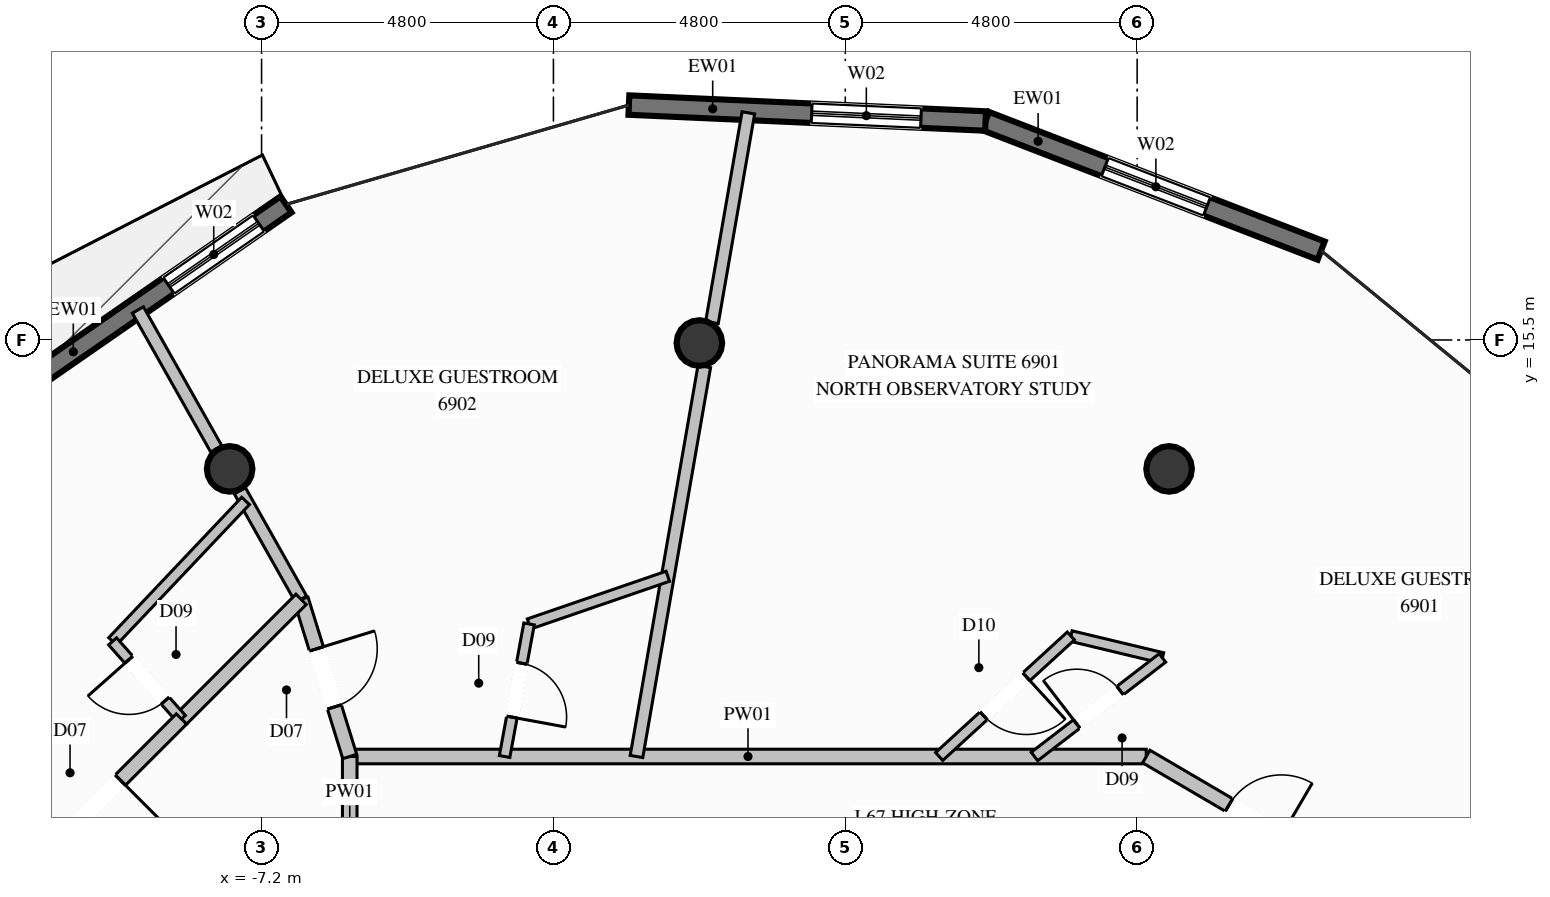
"""IFC4 building model, lengths in metres.
Left out: names, types, materials, properties, quantities, classifications, styles, units other than length and angle.
Written with IfcOpenShell. Run it as: python <this file> out.ifc"""

import sys

from ifc_helpers import new_model, si_unit, direction, frame, frame_2d, origin, origin_2d, place, context, subcontext, project, spatial, rectangle, circle, extrude, element, fill, save


model = new_model("IFC4")
c1 = context("Model", 3, precision=1e-05, world=origin(), true_north=direction((0.0, 1.0)))
c2 = subcontext(c1, "Body", "Model", "MODEL_VIEW")
j1 = project(units=[si_unit("LENGTHUNIT", "METRE"), si_unit("PLANEANGLEUNIT", "RADIAN")], contexts=[c1])
p1 = place(None, origin())
s1 = spatial("IfcSite", under=j1, at=p1, CompositionType="ELEMENT")
p2 = place(p1, origin())
s2 = spatial("IfcBuilding", under=s1, at=p2, CompositionType="ELEMENT")
p3 = place(p2, frame((0.0, 0.0, 258.2)))
s3 = spatial("IfcBuildingStorey", under=s2, at=p3, CompositionType="ELEMENT", Elevation=258.2)
for number, where, z_axis, x_axis in (
    (1, (7.725, 13.38, 0.0), (0.0, 0.0, 1.0), (1.0, 0.0, 0.0)),
    (2, (0.0, 15.45, 0.0), (0.0, 0.0, 1.0), (1.0, 0.0, 0.0)),
    (3, (-7.725, 13.38, 0.0), (0.0, 0.0, 1.0), (1.0, 0.0, 0.0)),
):
    element("IfcColumn", number, at=place(p3, frame(where, z_axis=z_axis, x_axis=x_axis)), inside=s3, PredefinedType="COLUMN", context=c2, shape_type="SweptSolid", body=[
        extrude(circle(Radius=0.375, at=origin_2d()), origin(), (0.0, 0.0, 1.0), 3.8),
    ])
p4 = place(p3, frame((4.707, 19.101, 0.0), z_axis=(0.0, 0.0, 1.0), x_axis=(0.932869372668, -0.360214843582, 0.0)))
e4 = element("IfcWall", 4, at=p4, inside=s3, PredefinedType="SOLIDWALL", context=c2, shape_type="SweptSolid", body=[
    extrude(rectangle(XDim=5.916, YDim=0.32, at=frame_2d((2.958, 0.0))), origin(), (0.0, 0.0, 1.0), 3.57),
])
p5 = place(p4, frame((2.103, 0.0, 0.35)))
e5 = element("IfcOpeningElement", 5, at=p5, cuts=e4, PredefinedType="OPENING", context=c2, shape_type="SweptSolid", body=[
    extrude(rectangle(XDim=1.8, YDim=2.6, at=frame_2d((0.9, 1.3))), frame((0.0, 0.17, 0.0), z_axis=(0.0, -1.0, 0.0), x_axis=(1.0, 0.0, 0.0)), (0.0, 0.0, 1.0), 0.34),
])
p6 = place(p3, frame((-1.159, 19.363, 0.0), z_axis=(0.0, 0.0, 1.0), x_axis=(0.999004316421, -0.044613627649, 0.0)))
e6 = element("IfcWall", 6, at=p6, inside=s3, PredefinedType="SOLIDWALL", context=c2, shape_type="SweptSolid", body=[
    extrude(rectangle(XDim=5.872, YDim=0.32, at=frame_2d((2.936, 0.0))), origin(), (0.0, 0.0, 1.0), 3.57),
])
p7 = place(p6, frame((3.009, 0.0, 0.35)))
e7 = element("IfcOpeningElement", 7, at=p7, cuts=e6, PredefinedType="OPENING", context=c2, shape_type="SweptSolid", body=[
    extrude(rectangle(XDim=1.8, YDim=2.6, at=frame_2d((0.9, 1.3))), frame((0.0, 0.17, 0.0), z_axis=(0.0, -1.0, 0.0), x_axis=(1.0, 0.0, 0.0)), (0.0, 0.0, 1.0), 0.34),
])
p8 = place(p3, frame((-11.661, 14.36, 0.0), z_axis=(0.0, 0.0, 1.0), x_axis=(0.821952888389, 0.569555483925, 0.0)))
e8 = element("IfcWall", 8, at=p8, inside=s3, PredefinedType="SOLIDWALL", context=c2, shape_type="SweptSolid", body=[
    extrude(rectangle(XDim=5.915, YDim=0.32, at=frame_2d((2.958, 0.0))), origin(), (0.0, 0.0, 1.0), 3.57),
])
p9 = place(p8, frame((3.57, 0.0, 0.35)))
e9 = element("IfcOpeningElement", 9, at=p9, cuts=e8, PredefinedType="OPENING", context=c2, shape_type="SweptSolid", body=[
    extrude(rectangle(XDim=1.8, YDim=2.6, at=frame_2d((0.9, 1.3))), frame((0.0, 0.17, 0.0), z_axis=(0.0, -1.0, 0.0), x_axis=(1.0, 0.0, 0.0)), (0.0, 0.0, 1.0), 0.34),
])
p10 = place(p3, frame((-5.75, 8.65, 0.0), z_axis=(0.0, 0.0, 1.0), x_axis=(1.0, 0.0, 0.0)))
e10 = element("IfcWall", 10, at=p10, inside=s3, PredefinedType="PARTITIONING", context=c2, shape_type="SweptSolid", body=[
    extrude(rectangle(XDim=13.1, YDim=0.24, at=frame_2d((6.55, 0.0))), origin(), (0.0, 0.0, 1.0), 3.57),
])
p11 = place(p3, frame((-5.75, 6.1, 0.0), z_axis=(0.0, 0.0, 1.0), x_axis=(0.0, 1.0, 0.0)))
e11 = element("IfcWall", 11, at=p11, inside=s3, PredefinedType="PARTITIONING", context=c2, shape_type="SweptSolid", body=[
    extrude(rectangle(XDim=2.55, YDim=0.24, at=frame_2d((1.275, 0.0))), origin(), (0.0, 0.0, 1.0), 3.57),
])
p12 = place(p3, frame((10.935, 6.55, 0.0), z_axis=(0.0, 0.0, 1.0), x_axis=(0.8804878863, 0.474068647011, 0.0)))
e12 = element("IfcWall", 12, at=p12, inside=s3, PredefinedType="PARTITIONING", context=c2, shape_type="SweptSolid", body=[
    extrude(rectangle(XDim=2.335, YDim=0.21, at=frame_2d((1.167, 0.0))), origin(), (0.0, 0.0, 1.0), 3.085),
])
p13 = place(p3, frame((-6.55, 11.235, 0.0), z_axis=(0.0, 0.0, 1.0), x_axis=(-0.491351277928, 0.87096149265, 0.0)))
e13 = element("IfcWall", 13, at=p13, inside=s3, PredefinedType="PARTITIONING", context=c2, shape_type="SweptSolid", body=[
    extrude(rectangle(XDim=2.052, YDim=0.21, at=frame_2d((1.026, 0.0))), origin(), (0.0, 0.0, 1.0), 3.085),
])
p14 = place(p3, frame((-7.945, 13.708, 0.0), z_axis=(0.0, 0.0, 1.0), x_axis=(-0.491290412496, 0.870995826965, 0.0)))
e14 = element("IfcWall", 14, at=p14, inside=s3, PredefinedType="PARTITIONING", context=c2, shape_type="SweptSolid", body=[
    extrude(rectangle(XDim=2.623, YDim=0.21, at=frame_2d((1.312, 0.0))), origin(), (0.0, 0.0, 1.0), 3.57),
])
p15 = place(p3, frame((6.11, 10.632, 0.0), z_axis=(0.0, 0.0, 1.0), x_axis=(0.972434507915, -0.233176173347, 0.0)))
e15 = element("IfcWall", 15, at=p15, inside=s3, PredefinedType="PLUMBINGWALL", context=c2, shape_type="SweptSolid", body=[
    extrude(rectangle(XDim=1.549, YDim=0.175, at=frame_2d((0.774, 0.0))), origin(), (0.0, 0.0, 1.0), 3.57),
])
p16 = place(p3, frame((6.11, 10.632, 0.0), z_axis=(0.0, 0.0, 1.0), x_axis=(-0.737719939181, -0.675106874009, 0.0)))
e16 = element("IfcWall", 16, at=p16, inside=s3, PredefinedType="PLUMBINGWALL", context=c2, shape_type="SweptSolid", body=[
    extrude(rectangle(XDim=2.936, YDim=0.175, at=frame_2d((1.468, 0.0))), origin(), (0.0, 0.0, 1.0), 3.57),
])
p17 = place(p16, frame((0.993, 0.0, 0.0)))
e17 = element("IfcOpeningElement", 17, at=p17, cuts=e16, PredefinedType="OPENING", context=c2, shape_type="SweptSolid", body=[
    extrude(rectangle(XDim=0.95, YDim=2.1, at=frame_2d((0.475, 1.05))), frame((0.0, 0.098, 0.0), z_axis=(0.0, -1.0, 0.0), x_axis=(1.0, 0.0, 0.0)), (0.0, 0.0, 1.0), 0.195),
])
p18 = place(p3, frame((5.511, 8.65, 0.0), z_axis=(0.0, 0.0, 1.0), x_axis=(0.792282263308, 0.610154746969, 0.0)))
e18 = element("IfcWall", 18, at=p18, inside=s3, PredefinedType="PLUMBINGWALL", context=c2, shape_type="SweptSolid", body=[
    extrude(rectangle(XDim=2.657, YDim=0.175, at=frame_2d((1.328, 0.0))), origin(), (0.0, 0.0, 1.0), 3.57),
])
p19 = place(p18, frame((0.878, 0.0, 0.0)))
e19 = element("IfcOpeningElement", 19, at=p19, cuts=e18, PredefinedType="OPENING", context=c2, shape_type="SweptSolid", body=[
    extrude(rectangle(XDim=0.9, YDim=2.1, at=frame_2d((0.45, 1.05))), frame((0.0, 0.098, 0.0), z_axis=(0.0, -1.0, 0.0), x_axis=(1.0, 0.0, 0.0)), (0.0, 0.0, 1.0), 0.195),
])
p20 = place(p3, frame((7.35, 8.65, 0.0), z_axis=(0.0, 0.0, 1.0), x_axis=(0.862873842462, -0.505419362505, 0.0)))
e20 = element("IfcWall", 20, at=p20, inside=s3, PredefinedType="PARTITIONING", context=c2, shape_type="SweptSolid", body=[
    extrude(rectangle(XDim=4.155, YDim=0.24, at=frame_2d((2.077, 0.0))), origin(), (0.0, 0.0, 1.0), 3.57),
])
p21 = place(p20, frame((1.577, 0.0, 0.0)))
e21 = element("IfcOpeningElement", 21, at=p21, cuts=e20, PredefinedType="OPENING", context=c2, shape_type="SweptSolid", body=[
    extrude(rectangle(XDim=1.0, YDim=2.2, at=frame_2d((0.5, 1.1))), frame((0.0, 0.13, 0.0), z_axis=(0.0, -1.0, 0.0), x_axis=(1.0, 0.0, 0.0)), (0.0, 0.0, 1.0), 0.26),
])
p22 = place(p3, frame((-1.034, 8.65, 0.0), z_axis=(0.0, 0.0, 1.0), x_axis=(0.171292106425, 0.985220287183, 0.0)))
e22 = element("IfcWall", 22, at=p22, inside=s3, PredefinedType="PARTITIONING", context=c2, shape_type="SweptSolid", body=[
    extrude(rectangle(XDim=6.509, YDim=0.21, at=frame_2d((3.255, 0.0))), origin(), (0.0, 0.0, 1.0), 3.57),
])
p23 = place(p3, frame((0.207, 15.787, 0.0), z_axis=(0.0, 0.0, 1.0), x_axis=(0.17112625243, 0.985249108464, 0.0)))
e23 = element("IfcWall", 23, at=p23, inside=s3, PredefinedType="PARTITIONING", context=c2, shape_type="SweptSolid", body=[
    extrude(rectangle(XDim=3.5, YDim=0.21, at=frame_2d((1.75, 0.0))), origin(), (0.0, 0.0, 1.0), 3.57),
])
p24 = place(p3, frame((-2.801, 10.83, 0.0), z_axis=(0.0, 0.0, 1.0), x_axis=(0.945749765069, 0.324895955455, 0.0)))
e24 = element("IfcWall", 24, at=p24, inside=s3, PredefinedType="PLUMBINGWALL", context=c2, shape_type="SweptSolid", body=[
    extrude(rectangle(XDim=2.413, YDim=0.175, at=frame_2d((1.207, 0.0))), origin(), (0.0, 0.0, 1.0), 3.57),
])
p25 = place(p3, frame((-2.801, 10.83, 0.0), z_axis=(0.0, 0.0, 1.0), x_axis=(-0.181268941006, -0.983433562081, 0.0)))
e25 = element("IfcWall", 25, at=p25, inside=s3, PredefinedType="PLUMBINGWALL", context=c2, shape_type="SweptSolid", body=[
    extrude(rectangle(XDim=2.217, YDim=0.175, at=frame_2d((1.108, 0.0))), origin(), (0.0, 0.0, 1.0), 3.57),
])
p26 = place(p25, frame((0.658, 0.0, 0.0)))
e26 = element("IfcOpeningElement", 26, at=p26, cuts=e25, PredefinedType="OPENING", context=c2, shape_type="SweptSolid", body=[
    extrude(rectangle(XDim=0.9, YDim=2.1, at=frame_2d((0.45, 1.05))), frame((0.0, 0.098, 0.0), z_axis=(0.0, -1.0, 0.0), x_axis=(1.0, 0.0, 0.0)), (0.0, 0.0, 1.0), 0.195),
])
p27 = place(p3, frame((-6.55, 11.235, 0.0), z_axis=(0.0, 0.0, 1.0), x_axis=(0.295638642954, -0.955299844443, 0.0)))
e27 = element("IfcWall", 27, at=p27, inside=s3, PredefinedType="PARTITIONING", context=c2, shape_type="SweptSolid", body=[
    extrude(rectangle(XDim=2.706, YDim=0.24, at=frame_2d((1.353, 0.0))), origin(), (0.0, 0.0, 1.0), 3.57),
])
p28 = place(p27, frame((0.853, 0.0, 0.0)))
e28 = element("IfcOpeningElement", 28, at=p28, cuts=e27, PredefinedType="OPENING", context=c2, shape_type="SweptSolid", body=[
    extrude(rectangle(XDim=1.0, YDim=2.2, at=frame_2d((0.5, 1.1))), frame((0.0, 0.13, 0.0), z_axis=(0.0, -1.0, 0.0), x_axis=(1.0, 0.0, 0.0)), (0.0, 0.0, 1.0), 0.26),
])
p29 = place(p3, frame((-6.55, 11.235, 0.0), z_axis=(0.0, 0.0, 1.0), x_axis=(-0.707106781187, -0.707106781187, 0.0)))
e29 = element("IfcWall", 29, at=p29, inside=s3, PredefinedType="PARTITIONING", context=c2, shape_type="SweptSolid", body=[
    extrude(rectangle(XDim=2.783, YDim=0.24, at=frame_2d((1.392, 0.0))), origin(), (0.0, 0.0, 1.0), 3.57),
])
p30 = place(p3, frame((-7.463, 12.853, 0.0), z_axis=(0.0, 0.0, 1.0), x_axis=(-0.687655215005, -0.726037399365, 0.0)))
e30 = element("IfcWall", 30, at=p30, inside=s3, PredefinedType="PLUMBINGWALL", context=c2, shape_type="SweptSolid", body=[
    extrude(rectangle(XDim=3.18, YDim=0.175, at=frame_2d((1.59, 0.0))), origin(), (0.0, 0.0, 1.0), 3.137),
])
p31 = place(p3, frame((-8.518, 9.267, 0.0), z_axis=(0.0, 0.0, 1.0), x_axis=(-0.663333009782, 0.748324340198, 0.0)))
e31 = element("IfcWall", 31, at=p31, inside=s3, PredefinedType="PLUMBINGWALL", context=c2, shape_type="SweptSolid", body=[
    extrude(rectangle(XDim=1.706, YDim=0.175, at=frame_2d((0.853, 0.0))), origin(), (0.0, 0.0, 1.0), 3.57),
])
p32 = place(p31, frame((0.403, 0.0, 0.0)))
e32 = element("IfcOpeningElement", 32, at=p32, cuts=e31, PredefinedType="OPENING", context=c2, shape_type="SweptSolid", body=[
    extrude(rectangle(XDim=0.9, YDim=2.1, at=frame_2d((0.45, 1.05))), frame((0.0, 0.098, 0.0), z_axis=(0.0, -1.0, 0.0), x_axis=(1.0, 0.0, 0.0)), (0.0, 0.0, 1.0), 0.195),
])
p33 = place(p3, frame((-8.518, 9.267, 0.0), z_axis=(0.0, 0.0, 1.0), x_axis=(-0.707106781187, -0.707106781187, 0.0)))
e33 = element("IfcWall", 33, at=p33, inside=s3, PredefinedType="PARTITIONING", context=c2, shape_type="SweptSolid", body=[
    extrude(rectangle(XDim=3.843, YDim=0.24, at=frame_2d((1.921, 0.0))), origin(), (0.0, 0.0, 1.0), 3.57),
])
p34 = place(p33, frame((1.421, 0.0, 0.0)))
e34 = element("IfcOpeningElement", 34, at=p34, cuts=e33, PredefinedType="OPENING", context=c2, shape_type="SweptSolid", body=[
    extrude(rectangle(XDim=1.0, YDim=2.2, at=frame_2d((0.5, 1.1))), frame((0.0, 0.13, 0.0), z_axis=(0.0, -1.0, 0.0), x_axis=(1.0, 0.0, 0.0)), (0.0, 0.0, 1.0), 0.26),
])
p35 = place(p5, origin())
e35 = element("IfcWindow", 35, at=p35, inside=s3, PartitioningType="SINGLE_PANEL", PredefinedType="WINDOW", context=c2, shape_type="SweptSolid", body=[
    extrude(rectangle(XDim=1.8, YDim=2.6, at=frame_2d((0.9, 1.3))), frame((0.0, 0.03, 0.0), z_axis=(0.0, -1.0, 0.0), x_axis=(1.0, 0.0, 0.0)), (0.0, 0.0, 1.0), 0.06),
])
fill(e5, e35)
p36 = place(p7, origin())
e36 = element("IfcWindow", 36, at=p36, inside=s3, PartitioningType="SINGLE_PANEL", PredefinedType="WINDOW", context=c2, shape_type="SweptSolid", body=[
    extrude(rectangle(XDim=1.8, YDim=2.6, at=frame_2d((0.9, 1.3))), frame((0.0, 0.03, 0.0), z_axis=(0.0, -1.0, 0.0), x_axis=(1.0, 0.0, 0.0)), (0.0, 0.0, 1.0), 0.06),
])
fill(e7, e36)
p37 = place(p9, origin())
e37 = element("IfcWindow", 37, at=p37, inside=s3, PartitioningType="SINGLE_PANEL", PredefinedType="WINDOW", context=c2, shape_type="SweptSolid", body=[
    extrude(rectangle(XDim=1.8, YDim=2.6, at=frame_2d((0.9, 1.3))), frame((0.0, 0.03, 0.0), z_axis=(0.0, -1.0, 0.0), x_axis=(1.0, 0.0, 0.0)), (0.0, 0.0, 1.0), 0.06),
])
fill(e9, e37)
p38 = place(p19, origin())
e38 = element("IfcDoor", 38, at=p38, inside=s3, OperationType="SINGLE_SWING_LEFT", PredefinedType="DOOR", context=c2, shape_type="SweptSolid", body=[
    extrude(rectangle(XDim=0.9, YDim=2.1, at=frame_2d((0.45, 1.05))), frame((0.0, 0.025, 0.0), z_axis=(0.0, -1.0, 0.0), x_axis=(1.0, 0.0, 0.0)), (0.0, 0.0, 1.0), 0.05),
])
fill(e19, e38)
p39 = place(p21, origin())
e39 = element("IfcDoor", 39, at=p39, inside=s3, OperationType="SINGLE_SWING_RIGHT", PredefinedType="DOOR", context=c2, shape_type="SweptSolid", body=[
    extrude(rectangle(XDim=1.0, YDim=2.2, at=frame_2d((0.5, 1.1))), frame((0.0, 0.025, 0.0), z_axis=(0.0, -1.0, 0.0), x_axis=(1.0, 0.0, 0.0)), (0.0, 0.0, 1.0), 0.05),
])
fill(e21, e39)
p40 = place(p17, origin())
e40 = element("IfcDoor", 40, at=p40, inside=s3, OperationType="SINGLE_SWING_LEFT", PredefinedType="DOOR", context=c2, shape_type="SweptSolid", body=[
    extrude(rectangle(XDim=0.95, YDim=2.1, at=frame_2d((0.475, 1.05))), frame((0.0, 0.025, 0.0), z_axis=(0.0, -1.0, 0.0), x_axis=(1.0, 0.0, 0.0)), (0.0, 0.0, 1.0), 0.05),
])
fill(e17, e40)
p41 = place(p26, origin())
e41 = element("IfcDoor", 41, at=p41, inside=s3, OperationType="SINGLE_SWING_RIGHT", PredefinedType="DOOR", context=c2, shape_type="SweptSolid", body=[
    extrude(rectangle(XDim=0.9, YDim=2.1, at=frame_2d((0.45, 1.05))), frame((0.0, 0.025, 0.0), z_axis=(0.0, -1.0, 0.0), x_axis=(1.0, 0.0, 0.0)), (0.0, 0.0, 1.0), 0.05),
])
fill(e26, e41)
p42 = place(p28, origin())
e42 = element("IfcDoor", 42, at=p42, inside=s3, OperationType="SINGLE_SWING_LEFT", PredefinedType="DOOR", context=c2, shape_type="SweptSolid", body=[
    extrude(rectangle(XDim=1.0, YDim=2.2, at=frame_2d((0.5, 1.1))), frame((0.0, 0.025, 0.0), z_axis=(0.0, -1.0, 0.0), x_axis=(1.0, 0.0, 0.0)), (0.0, 0.0, 1.0), 0.05),
])
fill(e28, e42)
p43 = place(p32, origin())
e43 = element("IfcDoor", 43, at=p43, inside=s3, OperationType="SINGLE_SWING_RIGHT", PredefinedType="DOOR", context=c2, shape_type="SweptSolid", body=[
    extrude(rectangle(XDim=0.9, YDim=2.1, at=frame_2d((0.45, 1.05))), frame((0.0, 0.025, 0.0), z_axis=(0.0, -1.0, 0.0), x_axis=(1.0, 0.0, 0.0)), (0.0, 0.0, 1.0), 0.05),
])
fill(e32, e43)
p44 = place(p34, origin())
e44 = element("IfcDoor", 44, at=p44, inside=s3, OperationType="SINGLE_SWING_LEFT", PredefinedType="DOOR", context=c2, shape_type="SweptSolid", body=[
    extrude(rectangle(XDim=1.0, YDim=2.2, at=frame_2d((0.5, 1.1))), frame((0.0, 0.025, 0.0), z_axis=(0.0, -1.0, 0.0), x_axis=(1.0, 0.0, 0.0)), (0.0, 0.0, 1.0), 0.05),
])
fill(e34, e44)
save(model, sys.argv[1])
